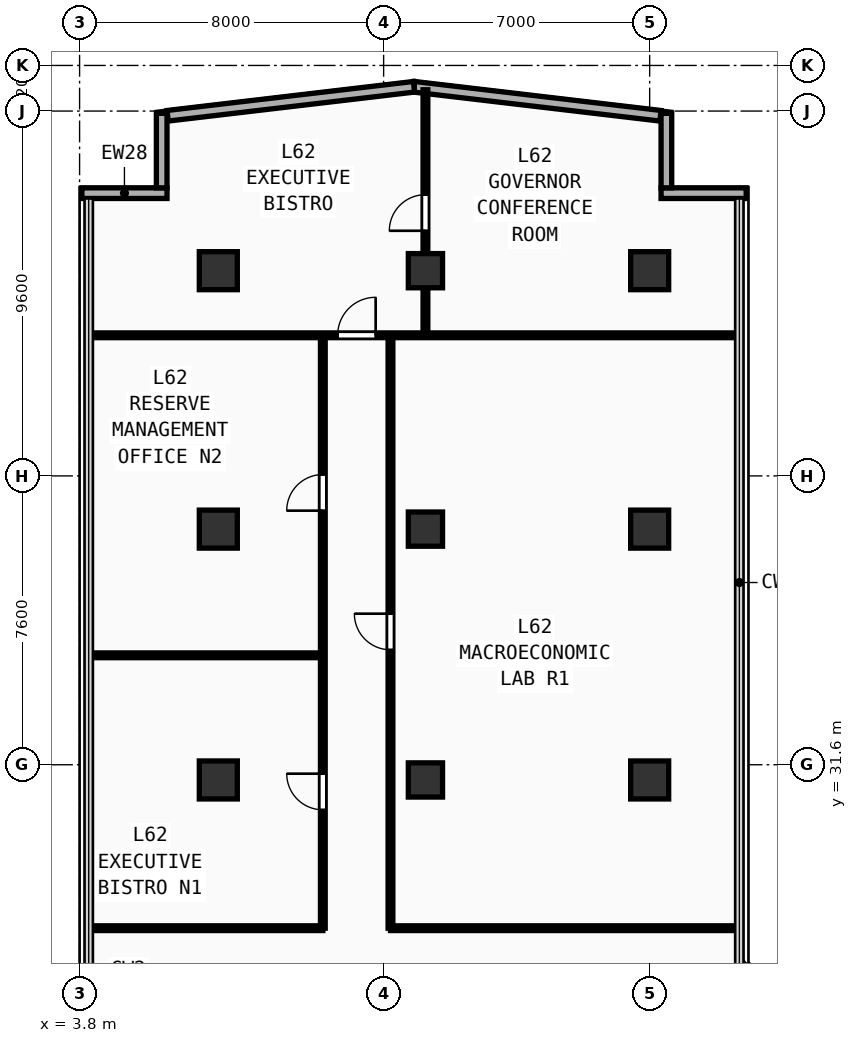
"""IFC4 building model, lengths in metres.
Left out: names, types, materials, properties, quantities, classifications, styles, units other than length and angle.
Written with IfcOpenShell. Run it as: python <this file> out.ifc"""

import sys

from ifc_helpers import new_model, si_unit, direction, frame, frame_2d, origin, origin_2d, place, context, subcontext, project, spatial, rectangle, extrude, element, fill, save


model = new_model("IFC4")
c1 = context("Model", 3, precision=1e-05, world=origin(), true_north=direction((0.0, 1.0)))
c2 = subcontext(c1, "Body", "Model", "MODEL_VIEW")
j1 = project(units=[si_unit("LENGTHUNIT", "METRE"), si_unit("PLANEANGLEUNIT", "RADIAN")], contexts=[c1])
p1 = place(None, origin())
s1 = spatial("IfcSite", under=j1, at=p1, CompositionType="ELEMENT")
p2 = place(p1, origin())
s2 = spatial("IfcBuilding", under=s1, at=p2, CompositionType="ELEMENT")
p3 = place(p2, frame((0.0, 0.0, 242.5)))
s3 = spatial("IfcBuildingStorey", under=s2, at=p3, CompositionType="ELEMENT", Elevation=242.5)
for number, where, z_axis, x_axis in (
    (1, (7.45, 31.2, 0.0), (0.0, 0.0, 1.0), (1.0, 0.0, 0.0)),
    (2, (7.45, 37.8, 0.0), (0.0, 0.0, 1.0), (1.0, 0.0, 0.0)),
    (3, (7.45, 44.6, 0.0), (0.0, 0.0, 1.0), (1.0, 0.0, 0.0)),
    (4, (18.8, 31.2, 0.0), (0.0, 0.0, 1.0), (1.0, 0.0, 0.0)),
    (5, (18.8, 37.8, 0.0), (0.0, 0.0, 1.0), (1.0, 0.0, 0.0)),
    (6, (18.8, 44.6, 0.0), (0.0, 0.0, 1.0), (1.0, 0.0, 0.0)),
):
    element("IfcColumn", number, at=place(p3, frame(where, z_axis=z_axis, x_axis=x_axis)), inside=s3, PredefinedType="COLUMN", context=c2, shape_type="SweptSolid", body=[
        extrude(rectangle(XDim=1.0, YDim=1.0, at=origin_2d()), origin(), (0.0, 0.0, 1.0), 3.56),
    ])
for number, where, z_axis, x_axis in (
    (7, (12.9, 31.2, 0.0), (0.0, 0.0, 1.0), (1.0, 0.0, 0.0)),
    (8, (12.9, 37.8, 0.0), (0.0, 0.0, 1.0), (1.0, 0.0, 0.0)),
    (9, (12.9, 44.6, 0.0), (0.0, 0.0, 1.0), (1.0, 0.0, 0.0)),
):
    element("IfcColumn", number, at=place(p3, frame(where, z_axis=z_axis, x_axis=x_axis)), inside=s3, PredefinedType="COLUMN", context=c2, shape_type="SweptSolid", body=[
        extrude(rectangle(XDim=0.9, YDim=0.9, at=origin_2d()), origin(), (0.0, 0.0, 1.0), 3.56),
    ])
p4 = place(p3, frame((19.1, 46.64, 0.0), z_axis=(0.0, 0.0, 1.0), x_axis=(1.0, 0.0, 0.0)))
e10 = element("IfcWall", 10, at=p4, inside=s3, PredefinedType="SOLIDWALL", context=c2, shape_type="SweptSolid", body=[
    extrude(rectangle(XDim=2.24, YDim=0.28, at=frame_2d((1.12, 0.0))), origin(), (0.0, 0.0, 1.0), 3.56),
])
p5 = place(p3, frame((19.24, 46.78, 0.0), z_axis=(0.0, 0.0, 1.0), x_axis=(0.0, 1.0, 0.0)))
e11 = element("IfcWall", 11, at=p5, inside=s3, PredefinedType="SOLIDWALL", context=c2, shape_type="SweptSolid", body=[
    extrude(rectangle(XDim=1.96, YDim=0.28, at=frame_2d((0.98, 0.0))), origin(), (0.0, 0.0, 1.0), 3.56),
])
p6 = place(p3, frame((3.86, 46.64, 0.0), z_axis=(0.0, 0.0, 1.0), x_axis=(1.0, 0.0, 0.0)))
e12 = element("IfcWall", 12, at=p6, inside=s3, PredefinedType="SOLIDWALL", context=c2, shape_type="SweptSolid", body=[
    extrude(rectangle(XDim=2.24, YDim=0.28, at=frame_2d((1.12, 0.0))), origin(), (0.0, 0.0, 1.0), 3.56),
])
p7 = place(p3, frame((5.96, 46.78, 0.0), z_axis=(0.0, 0.0, 1.0), x_axis=(0.0, 1.0, 0.0)))
e13 = element("IfcWall", 13, at=p7, inside=s3, PredefinedType="SOLIDWALL", context=c2, shape_type="SweptSolid", body=[
    extrude(rectangle(XDim=1.96, YDim=0.28, at=frame_2d((0.98, 0.0))), origin(), (0.0, 0.0, 1.0), 3.56),
])
p8 = place(p3, frame((27.685, 19.775, 0.0), z_axis=(0.0, 0.0, 1.0), x_axis=(-0.707106781187, 0.707106781187, 0.0)))
e14 = element("IfcWall", 14, at=p8, inside=s3, PredefinedType="SOLIDWALL", context=c2, shape_type="SweptSolid", body=[
    extrude(rectangle(XDim=9.207, YDim=0.28, at=frame_2d((4.603, 0.0))), origin(), (0.0, 0.0, 1.0), 3.56),
])
for number, where, z_axis, x_axis in (
    (15, (19.083, 48.676, 0.0), (0.0, 0.0, 1.0), (-0.993, 0.117, 0.0)),
    (16, (12.599, 49.439, 0.0), (0.0, 0.0, 1.0), (-0.993, -0.117, 0.0)),
):
    element("IfcWall", number, at=place(p3, frame(where, z_axis=z_axis, x_axis=x_axis)), inside=s3, PredefinedType="SOLIDWALL", context=c2, shape_type="SweptSolid", body=[
        extrude(rectangle(XDim=6.527, YDim=0.28, at=frame_2d((3.263, 0.0))), origin(), (0.0, 0.0, 1.0), 3.56),
    ])
p9 = place(p3, frame((4.04, 27.3, 0.0), z_axis=(0.0, 0.0, 1.0), x_axis=(1.0, 0.0, 0.0)))
e17 = element("IfcWall", 17, at=p9, inside=s3, PredefinedType="PARTITIONING", context=c2, shape_type="SweptSolid", body=[
    extrude(rectangle(XDim=6.16, YDim=0.125, at=frame_2d((3.08, 0.0))), origin(), (0.0, 0.0, 1.0), 3.56),
])
p10 = place(p3, frame((10.2, 27.3, 0.0), z_axis=(0.0, 0.0, 1.0), x_axis=(0.0, 1.0, 0.0)))
e18 = element("IfcWall", 18, at=p10, inside=s3, PredefinedType="PARTITIONING", context=c2, shape_type="SweptSolid", body=[
    extrude(rectangle(XDim=15.6, YDim=0.125, at=frame_2d((7.8, 0.0))), origin(), (0.0, 0.0, 1.0), 3.56),
])
p11 = place(p10, frame((3.115, 0.0, 0.0)))
e19 = element("IfcOpeningElement", 19, at=p11, cuts=e18, PredefinedType="OPENING", context=c2, shape_type="SweptSolid", body=[
    extrude(rectangle(XDim=0.95, YDim=2.15, at=frame_2d((0.475, 1.075))), frame((0.0, 0.073, 0.0), z_axis=(0.0, -1.0, 0.0), x_axis=(1.0, 0.0, 0.0)), (0.0, 0.0, 1.0), 0.145),
])
p12 = place(p10, frame((10.986, 0.0, 0.0)))
e20 = element("IfcOpeningElement", 20, at=p12, cuts=e18, PredefinedType="OPENING", context=c2, shape_type="SweptSolid", body=[
    extrude(rectangle(XDim=0.95, YDim=2.15, at=frame_2d((0.475, 1.075))), frame((0.0, 0.073, 0.0), z_axis=(0.0, -1.0, 0.0), x_axis=(1.0, 0.0, 0.0)), (0.0, 0.0, 1.0), 0.145),
])
p13 = place(p3, frame((4.04, 34.48, 0.0), z_axis=(0.0, 0.0, 1.0), x_axis=(1.0, 0.0, 0.0)))
e21 = element("IfcWall", 21, at=p13, inside=s3, PredefinedType="PARTITIONING", context=c2, shape_type="SweptSolid", body=[
    extrude(rectangle(XDim=6.16, YDim=0.125, at=frame_2d((3.08, 0.0))), origin(), (0.0, 0.0, 1.0), 3.56),
])
p14 = place(p3, frame((4.04, 42.9, 0.0), z_axis=(0.0, 0.0, 1.0), x_axis=(1.0, 0.0, 0.0)))
e22 = element("IfcWall", 22, at=p14, inside=s3, PredefinedType="PARTITIONING", context=c2, shape_type="SweptSolid", body=[
    extrude(rectangle(XDim=17.12, YDim=0.125, at=frame_2d((8.56, 0.0))), origin(), (0.0, 0.0, 1.0), 3.56),
])
p15 = place(p14, frame((6.55, 0.0, 0.0)))
e23 = element("IfcOpeningElement", 23, at=p15, cuts=e22, PredefinedType="OPENING", context=c2, shape_type="SweptSolid", body=[
    extrude(rectangle(XDim=1.0, YDim=2.2, at=frame_2d((0.5, 1.1))), frame((0.0, 0.073, 0.0), z_axis=(0.0, -1.0, 0.0), x_axis=(1.0, 0.0, 0.0)), (0.0, 0.0, 1.0), 0.145),
])
p16 = place(p3, frame((12.9, 42.9, 0.0), z_axis=(0.0, 0.0, 1.0), x_axis=(0.0, 1.0, 0.0)))
e24 = element("IfcWall", 24, at=p16, inside=s3, PredefinedType="PARTITIONING", context=c2, shape_type="SweptSolid", body=[
    extrude(rectangle(XDim=6.46, YDim=0.125, at=frame_2d((3.23, 0.0))), origin(), (0.0, 0.0, 1.0), 3.16),
])
p17 = place(p16, frame((2.75, 0.0, 0.0)))
e25 = element("IfcOpeningElement", 25, at=p17, cuts=e24, PredefinedType="OPENING", context=c2, shape_type="SweptSolid", body=[
    extrude(rectangle(XDim=0.95, YDim=2.15, at=frame_2d((0.475, 1.075))), frame((0.0, 0.073, 0.0), z_axis=(0.0, -1.0, 0.0), x_axis=(1.0, 0.0, 0.0)), (0.0, 0.0, 1.0), 0.145),
])
p18 = place(p3, frame((11.98, 27.3, 0.0), z_axis=(0.0, 0.0, 1.0), x_axis=(1.0, 0.0, 0.0)))
e26 = element("IfcWall", 26, at=p18, inside=s3, PredefinedType="PARTITIONING", context=c2, shape_type="SweptSolid", body=[
    extrude(rectangle(XDim=9.18, YDim=0.125, at=frame_2d((4.59, 0.0))), origin(), (0.0, 0.0, 1.0), 3.56),
])
p19 = place(p3, frame((11.98, 27.3, 0.0), z_axis=(0.0, 0.0, 1.0), x_axis=(0.0, 1.0, 0.0)))
e27 = element("IfcWall", 27, at=p19, inside=s3, PredefinedType="PARTITIONING", context=c2, shape_type="SweptSolid", body=[
    extrude(rectangle(XDim=15.6, YDim=0.125, at=frame_2d((7.8, 0.0))), origin(), (0.0, 0.0, 1.0), 3.56),
])
p20 = place(p19, frame((7.325, 0.0, 0.0)))
e28 = element("IfcOpeningElement", 28, at=p20, cuts=e27, PredefinedType="OPENING", context=c2, shape_type="SweptSolid", body=[
    extrude(rectangle(XDim=0.95, YDim=2.15, at=frame_2d((0.475, 1.075))), frame((0.0, 0.073, 0.0), z_axis=(0.0, -1.0, 0.0), x_axis=(1.0, 0.0, 0.0)), (0.0, 0.0, 1.0), 0.145),
])
p21 = place(p11, origin())
e29 = element("IfcDoor", 29, at=p21, inside=s3, OperationType="SINGLE_SWING_RIGHT", PredefinedType="DOOR", context=c2, shape_type="SweptSolid", body=[
    extrude(rectangle(XDim=0.95, YDim=2.15, at=frame_2d((0.475, 1.075))), frame((0.0, 0.025, 0.0), z_axis=(0.0, -1.0, 0.0), x_axis=(1.0, 0.0, 0.0)), (0.0, 0.0, 1.0), 0.05),
])
fill(e19, e29)
p22 = place(p12, origin())
e30 = element("IfcDoor", 30, at=p22, inside=s3, OperationType="SINGLE_SWING_LEFT", PredefinedType="DOOR", context=c2, shape_type="SweptSolid", body=[
    extrude(rectangle(XDim=0.95, YDim=2.15, at=frame_2d((0.475, 1.075))), frame((0.0, 0.025, 0.0), z_axis=(0.0, -1.0, 0.0), x_axis=(1.0, 0.0, 0.0)), (0.0, 0.0, 1.0), 0.05),
])
fill(e20, e30)
p23 = place(p15, origin())
e31 = element("IfcDoor", 31, at=p23, inside=s3, OperationType="SINGLE_SWING_RIGHT", PredefinedType="DOOR", context=c2, shape_type="SweptSolid", body=[
    extrude(rectangle(XDim=1.0, YDim=2.2, at=frame_2d((0.5, 1.1))), frame((0.0, 0.025, 0.0), z_axis=(0.0, -1.0, 0.0), x_axis=(1.0, 0.0, 0.0)), (0.0, 0.0, 1.0), 0.05),
])
fill(e23, e31)
p24 = place(p17, origin())
e32 = element("IfcDoor", 32, at=p24, inside=s3, OperationType="SINGLE_SWING_LEFT", PredefinedType="DOOR", context=c2, shape_type="SweptSolid", body=[
    extrude(rectangle(XDim=0.95, YDim=2.15, at=frame_2d((0.475, 1.075))), frame((0.0, 0.025, 0.0), z_axis=(0.0, -1.0, 0.0), x_axis=(1.0, 0.0, 0.0)), (0.0, 0.0, 1.0), 0.05),
])
fill(e25, e32)
p25 = place(p20, origin())
e33 = element("IfcDoor", 33, at=p25, inside=s3, OperationType="SINGLE_SWING_RIGHT", PredefinedType="DOOR", context=c2, shape_type="SweptSolid", body=[
    extrude(rectangle(XDim=0.95, YDim=2.15, at=frame_2d((0.475, 1.075))), frame((0.0, 0.025, 0.0), z_axis=(0.0, -1.0, 0.0), x_axis=(1.0, 0.0, 0.0)), (0.0, 0.0, 1.0), 0.05),
])
fill(e28, e33)
save(model, sys.argv[1])
